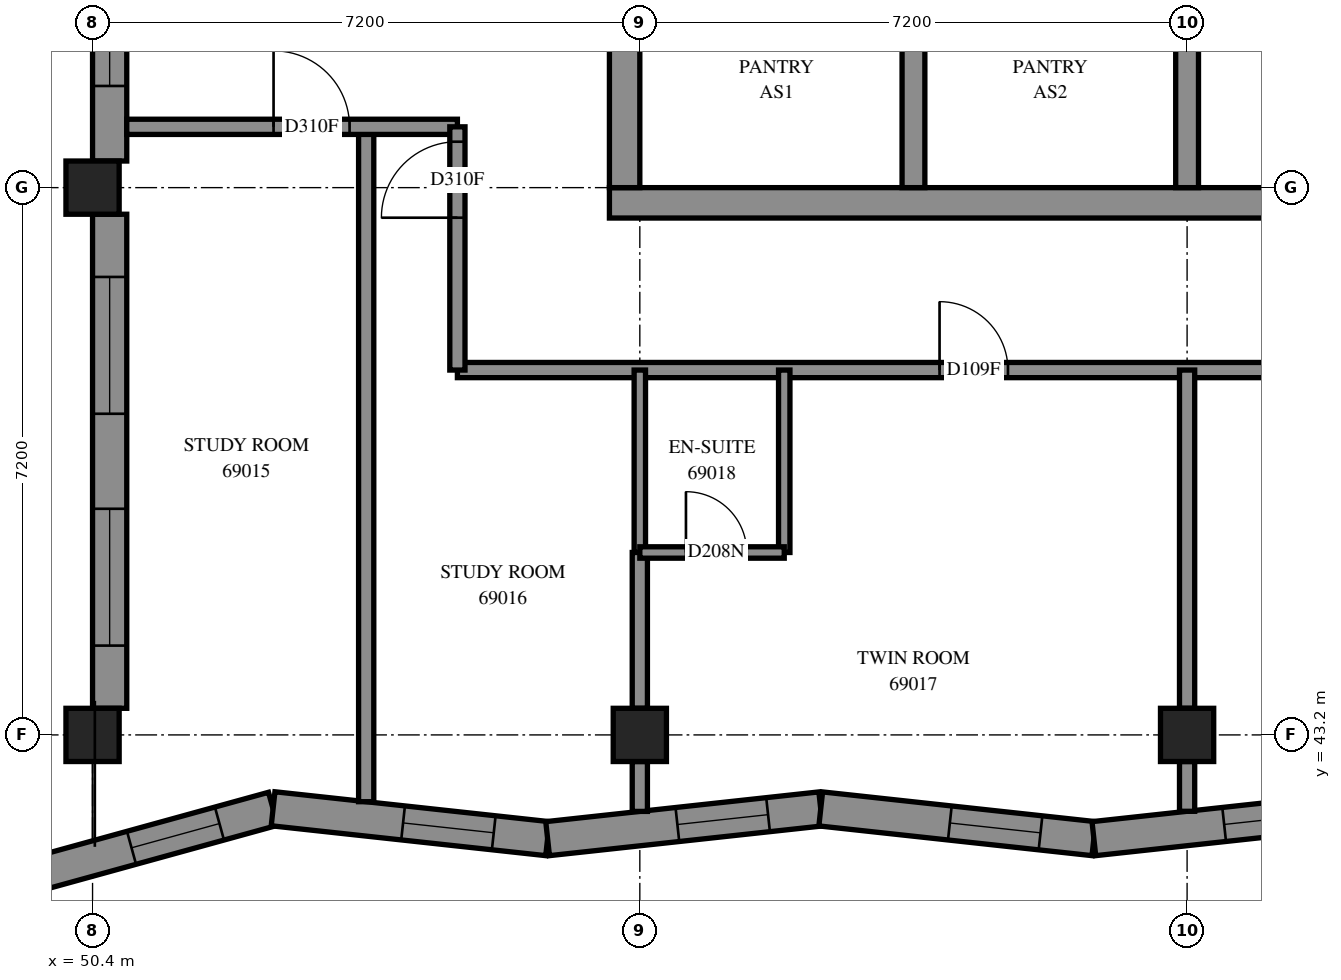
"""IFC4 building model, lengths in metres.
Left out: names, types, materials, properties, quantities, classifications, styles, units other than length and angle.
Written with IfcOpenShell. Run it as: python <this file> out.ifc"""

import sys

from ifc_helpers import new_model, si_unit, direction, frame, frame_2d, origin, origin_2d, place, context, subcontext, project, spatial, polyline, rectangle, outline, extrude, element, fill, save


model = new_model("IFC4")
c1 = context("Model", 3, precision=1e-05, world=origin(), true_north=direction((0.0, 1.0)))
c2 = subcontext(c1, "Body", "Model", "MODEL_VIEW")
j1 = project(units=[si_unit("LENGTHUNIT", "METRE"), si_unit("PLANEANGLEUNIT", "RADIAN")], contexts=[c1])
p1 = place(None, origin())
s1 = spatial("IfcSite", under=j1, at=p1, CompositionType="ELEMENT")
p2 = place(p1, origin())
s2 = spatial("IfcBuilding", under=s1, at=p2, CompositionType="ELEMENT")
p3 = place(p2, frame((0.0, 0.0, 254.0)))
s3 = spatial("IfcBuildingStorey", under=s2, at=p3, CompositionType="ELEMENT", Elevation=254.0)
for number, where, z_axis, x_axis in (
    (1, (50.4, 43.2, 0.0), (0.0, 0.0, 1.0), (1.0, 0.0, 0.0)),
    (2, (50.4, 50.4, 0.0), (0.0, 0.0, 1.0), (1.0, 0.0, 0.0)),
    (3, (57.6, 43.2, 0.0), (0.0, 0.0, 1.0), (1.0, 0.0, 0.0)),
    (4, (64.8, 43.2, 0.0), (0.0, 0.0, 1.0), (1.0, 0.0, 0.0)),
):
    element("IfcColumn", number, at=place(p3, frame(where, z_axis=z_axis, x_axis=x_axis)), inside=s3, PredefinedType="COLUMN", context=c2, shape_type="SweptSolid", body=[
        extrude(rectangle(XDim=0.7, YDim=0.7, at=origin_2d()), origin(), (0.0, 0.0, 1.0), 3.1),
    ])
p4 = place(p3, frame((57.2, 50.2, -0.3), z_axis=(0.0, 0.0, 1.0), x_axis=(1.0, 0.0, 0.0)))
e5 = element("IfcWall", 5, at=p4, inside=s3, PredefinedType="SHEAR", context=c2, shape_type="SweptSolid", body=[
    extrude(rectangle(XDim=15.2, YDim=0.4, at=frame_2d((7.6, 0.0))), origin(), (0.0, 0.0, 1.0), 2.7),
])
p5 = place(p3, frame((57.4, 50.4, -0.3), z_axis=(0.0, 0.0, 1.0), x_axis=(0.0, 1.0, 0.0)))
e6 = element("IfcWall", 6, at=p5, inside=s3, PredefinedType="SHEAR", context=c2, shape_type="SweptSolid", body=[
    extrude(rectangle(XDim=14.4, YDim=0.4, at=frame_2d((7.2, 0.0))), origin(), (0.0, 0.0, 1.0), 2.7),
])
p6 = place(p5, frame((4.55, 0.0, 0.3)))
e7 = element("IfcOpeningElement", 7, at=p6, cuts=e6, PredefinedType="OPENING", context=c2, shape_type="SweptSolid", body=[
    extrude(rectangle(XDim=1.1, YDim=2.1, at=frame_2d((0.55, 1.05))), frame((0.0, 0.21, 0.0), z_axis=(0.0, -1.0, 0.0), x_axis=(1.0, 0.0, 0.0)), (0.0, 0.0, 1.0), 0.42),
])
p7 = place(p5, frame((11.35, 0.0, 0.3)))
e8 = element("IfcOpeningElement", 8, at=p7, cuts=e6, PredefinedType="OPENING", context=c2, shape_type="SweptSolid", body=[
    extrude(rectangle(XDim=1.1, YDim=2.1, at=frame_2d((0.55, 1.05))), frame((0.0, 0.21, 0.0), z_axis=(0.0, -1.0, 0.0), x_axis=(1.0, 0.0, 0.0)), (0.0, 0.0, 1.0), 0.42),
])
for number, where, z_axis, x_axis in (
    (9, (61.2, 50.4, 0.0), (0.0, 0.0, 1.0), (0.0, 1.0, 0.0)),
    (10, (64.8, 50.4, 0.0), (0.0, 0.0, 1.0), (0.0, 1.0, 0.0)),
):
    element("IfcWall", number, at=place(p3, frame(where, z_axis=z_axis, x_axis=x_axis)), inside=s3, PredefinedType="SOLIDWALL", context=c2, shape_type="SweptSolid", body=[
        extrude(rectangle(XDim=3.3, YDim=0.3, at=frame_2d((1.65, 0.0))), origin(), (0.0, 0.0, 1.0), 3.1),
    ])
p8 = place(p3, frame((49.425, 41.304, 0.0), z_axis=(0.0, 0.0, 1.0), x_axis=(0.9640175431, 0.2658386288, 0.0)))
e11 = element("IfcWall", 11, at=p8, inside=s3, PredefinedType="SOLIDWALL", context=c2, shape_type="SweptSolid", body=[
    extrude(outline(polyline([(-0.295, -0.225), (3.432, -0.225), (3.518, 0.225), (0.295, 0.225), (-0.295, -0.225)])), origin(), (0.0, 0.0, 1.0), 3.1),
])
p9 = place(p8, frame((1.543, 0.0, 0.45)))
e12 = element("IfcOpeningElement", 12, at=p9, cuts=e11, PredefinedType="OPENING", context=c2, shape_type="SweptSolid", body=[
    extrude(rectangle(XDim=1.2, YDim=2.55, at=frame_2d((0.6, 1.275))), frame((0.0, 0.235, 0.0), z_axis=(0.0, -1.0, 0.0), x_axis=(1.0, 0.0, 0.0)), (0.0, 0.0, 1.0), 0.47),
])
p10 = place(p3, frame((52.775, 42.228, 0.0), z_axis=(0.0, 0.0, 1.0), x_axis=(0.9941319215, -0.108174501, 0.0)))
e13 = element("IfcWall", 13, at=p10, inside=s3, PredefinedType="SOLIDWALL", context=c2, shape_type="SweptSolid", body=[
    extrude(outline(polyline([(0.043, -0.225), (3.658, -0.225), (3.609, 0.225), (-0.043, 0.225), (0.043, -0.225)])), origin(), (0.0, 0.0, 1.0), 3.1),
])
p11 = place(p10, frame((1.72, 0.0, 0.45)))
e14 = element("IfcOpeningElement", 14, at=p11, cuts=e13, PredefinedType="OPENING", context=c2, shape_type="SweptSolid", body=[
    extrude(rectangle(XDim=1.2, YDim=2.55, at=frame_2d((0.6, 1.275))), frame((0.0, 0.235, 0.0), z_axis=(0.0, -1.0, 0.0), x_axis=(1.0, 0.0, 0.0)), (0.0, 0.0, 1.0), 0.47),
])
p12 = place(p3, frame((56.387, 41.835, 0.0), z_axis=(0.0, 0.0, 1.0), x_axis=(0.994132181, 0.1081721163, 0.0)))
e15 = element("IfcWall", 15, at=p12, inside=s3, PredefinedType="SOLIDWALL", context=c2, shape_type="SweptSolid", body=[
    extrude(outline(polyline([(-0.025, -0.225), (3.59, -0.225), (3.639, 0.225), (0.025, 0.225), (-0.025, -0.225)])), origin(), (0.0, 0.0, 1.0), 3.1),
])
p13 = place(p12, frame((1.718, 0.0, 0.45)))
e16 = element("IfcOpeningElement", 16, at=p13, cuts=e15, PredefinedType="OPENING", context=c2, shape_type="SweptSolid", body=[
    extrude(rectangle(XDim=1.2, YDim=2.55, at=frame_2d((0.6, 1.275))), frame((0.0, 0.235, 0.0), z_axis=(0.0, -1.0, 0.0), x_axis=(1.0, 0.0, 0.0)), (0.0, 0.0, 1.0), 0.47),
])
p14 = place(p3, frame((59.98, 42.226, 0.0), z_axis=(0.0, 0.0, 1.0), x_axis=(0.994132181, -0.1081721163, 0.0)))
e17 = element("IfcWall", 17, at=p14, inside=s3, PredefinedType="SOLIDWALL", context=c2, shape_type="SweptSolid", body=[
    extrude(outline(polyline([(0.025, -0.225), (3.639, -0.225), (3.59, 0.225), (-0.025, 0.225), (0.025, -0.225)])), origin(), (0.0, 0.0, 1.0), 3.1),
])
p15 = place(p14, frame((1.709, 0.0, 0.45)))
e18 = element("IfcOpeningElement", 18, at=p15, cuts=e17, PredefinedType="OPENING", context=c2, shape_type="SweptSolid", body=[
    extrude(rectangle(XDim=1.2, YDim=2.55, at=frame_2d((0.6, 1.275))), frame((0.0, 0.235, 0.0), z_axis=(0.0, -1.0, 0.0), x_axis=(1.0, 0.0, 0.0)), (0.0, 0.0, 1.0), 0.47),
])
p16 = place(p3, frame((63.574, 41.835, 0.0), z_axis=(0.0, 0.0, 1.0), x_axis=(0.9941318572, 0.1081750915, 0.0)))
e19 = element("IfcWall", 19, at=p16, inside=s3, PredefinedType="SOLIDWALL", context=c2, shape_type="SweptSolid", body=[
    extrude(outline(polyline([(-0.025, -0.225), (3.59, -0.225), (3.639, 0.225), (0.025, 0.225), (-0.025, -0.225)])), origin(), (0.0, 0.0, 1.0), 3.1),
])
p17 = place(p16, frame((1.724, 0.0, 0.45)))
e20 = element("IfcOpeningElement", 20, at=p17, cuts=e19, PredefinedType="OPENING", context=c2, shape_type="SweptSolid", body=[
    extrude(rectangle(XDim=1.2, YDim=2.55, at=frame_2d((0.6, 1.275))), frame((0.0, 0.235, 0.0), z_axis=(0.0, -1.0, 0.0), x_axis=(1.0, 0.0, 0.0)), (0.0, 0.0, 1.0), 0.47),
])
p18 = place(p3, frame((50.625, 57.25, 0.0), z_axis=(0.0, 0.0, 1.0), x_axis=(0.0, -1.0, 0.0)))
e21 = element("IfcWall", 21, at=p18, inside=s3, PredefinedType="SOLIDWALL", context=c2, shape_type="SweptSolid", body=[
    extrude(rectangle(XDim=6.5, YDim=0.45, at=frame_2d((3.25, 0.0))), origin(), (0.0, 0.0, 1.0), 3.1),
])
p19 = place(p18, frame((0.825, 0.0, 0.7)))
e22 = element("IfcOpeningElement", 22, at=p19, cuts=e21, PredefinedType="OPENING", context=c2, shape_type="SweptSolid", body=[
    extrude(rectangle(XDim=1.8, YDim=1.8, at=frame_2d((0.9, 0.9))), frame((0.0, 0.235, 0.0), z_axis=(0.0, -1.0, 0.0), x_axis=(1.0, 0.0, 0.0)), (0.0, 0.0, 1.0), 0.47),
])
p20 = place(p18, frame((4.312, 0.0, 0.6)))
e23 = element("IfcOpeningElement", 23, at=p20, cuts=e21, PredefinedType="OPENING", context=c2, shape_type="SweptSolid", body=[
    extrude(rectangle(XDim=1.2, YDim=1.9, at=frame_2d((0.6, 0.95))), frame((0.0, 0.235, 0.0), z_axis=(0.0, -1.0, 0.0), x_axis=(1.0, 0.0, 0.0)), (0.0, 0.0, 1.0), 0.47),
])
p21 = place(p3, frame((50.625, 50.05, 0.0), z_axis=(0.0, 0.0, 1.0), x_axis=(0.0, -1.0, 0.0)))
e24 = element("IfcWall", 24, at=p21, inside=s3, PredefinedType="SOLIDWALL", context=c2, shape_type="SweptSolid", body=[
    extrude(rectangle(XDim=6.5, YDim=0.45, at=frame_2d((3.25, 0.0))), origin(), (0.0, 0.0, 1.0), 3.1),
])
p22 = place(p21, frame((0.825, 0.0, 0.7)))
e25 = element("IfcOpeningElement", 25, at=p22, cuts=e24, PredefinedType="OPENING", context=c2, shape_type="SweptSolid", body=[
    extrude(rectangle(XDim=1.8, YDim=1.8, at=frame_2d((0.9, 0.9))), frame((0.0, 0.235, 0.0), z_axis=(0.0, -1.0, 0.0), x_axis=(1.0, 0.0, 0.0)), (0.0, 0.0, 1.0), 0.47),
])
p23 = place(p21, frame((3.875, 0.0, 0.7)))
e26 = element("IfcOpeningElement", 26, at=p23, cuts=e24, PredefinedType="OPENING", context=c2, shape_type="SweptSolid", body=[
    extrude(rectangle(XDim=1.8, YDim=1.8, at=frame_2d((0.9, 0.9))), frame((0.0, 0.235, 0.0), z_axis=(0.0, -1.0, 0.0), x_axis=(1.0, 0.0, 0.0)), (0.0, 0.0, 1.0), 0.47),
])
p24 = place(p3, frame((55.2, 48.0, 0.0), z_axis=(0.0, 0.0, 1.0), x_axis=(1.0, 0.0, 0.0)))
e27 = element("IfcWall", 27, at=p24, inside=s3, PredefinedType="PARTITIONING", context=c2, shape_type="SweptSolid", body=[
    extrude(rectangle(XDim=19.15, YDim=0.2, at=frame_2d((9.575, 0.0))), origin(), (0.0, 0.0, 1.0), 3.1),
])
p25 = place(p24, frame((6.343, 0.0, 0.0)))
e28 = element("IfcOpeningElement", 28, at=p25, cuts=e27, PredefinedType="OPENING", context=c2, shape_type="SweptSolid", body=[
    extrude(rectangle(XDim=0.9, YDim=2.1, at=frame_2d((0.45, 1.05))), frame((0.0, 0.11, 0.0), z_axis=(0.0, -1.0, 0.0), x_axis=(1.0, 0.0, 0.0)), (0.0, 0.0, 1.0), 0.22),
])
p26 = place(p24, frame((11.633, 0.0, 0.0)))
e29 = element("IfcOpeningElement", 29, at=p26, cuts=e27, PredefinedType="OPENING", context=c2, shape_type="SweptSolid", body=[
    extrude(rectangle(XDim=1.0, YDim=2.1, at=frame_2d((0.5, 1.05))), frame((0.0, 0.11, 0.0), z_axis=(0.0, -1.0, 0.0), x_axis=(1.0, 0.0, 0.0)), (0.0, 0.0, 1.0), 0.22),
])
p27 = place(p24, frame((13.707, 0.0, 0.0)))
e30 = element("IfcOpeningElement", 30, at=p27, cuts=e27, PredefinedType="OPENING", context=c2, shape_type="SweptSolid", body=[
    extrude(rectangle(XDim=1.0, YDim=2.1, at=frame_2d((0.5, 1.05))), frame((0.0, 0.11, 0.0), z_axis=(0.0, -1.0, 0.0), x_axis=(1.0, 0.0, 0.0)), (0.0, 0.0, 1.0), 0.22),
])
p28 = place(p3, frame((54.0, 42.321, 0.0), z_axis=(0.0, 0.0, 1.0), x_axis=(0.0, 1.0, 0.0)))
e31 = element("IfcWall", 31, at=p28, inside=s3, PredefinedType="PARTITIONING", context=c2, shape_type="SweptSolid", body=[
    extrude(rectangle(XDim=8.879, YDim=0.2, at=frame_2d((4.439, 0.0))), origin(), (0.0, 0.0, 1.0), 3.1),
])
p29 = place(p3, frame((64.8, 43.55, 0.0), z_axis=(0.0, 0.0, 1.0), x_axis=(0.0, 1.0, 0.0)))
e32 = element("IfcWall", 32, at=p29, inside=s3, PredefinedType="PARTITIONING", context=c2, shape_type="SweptSolid", body=[
    extrude(rectangle(XDim=4.45, YDim=0.2, at=frame_2d((2.225, 0.0))), origin(), (0.0, 0.0, 1.0), 3.1),
])
p30 = place(p3, frame((50.85, 51.2, 0.0), z_axis=(0.0, 0.0, 1.0), x_axis=(1.0, 0.0, 0.0)))
e33 = element("IfcWall", 33, at=p30, inside=s3, PredefinedType="PARTITIONING", context=c2, shape_type="SweptSolid", body=[
    extrude(rectangle(XDim=4.35, YDim=0.2, at=frame_2d((2.175, 0.0))), origin(), (0.0, 0.0, 1.0), 3.1),
])
p31 = place(p30, frame((1.931, 0.0, 0.0)))
e34 = element("IfcOpeningElement", 34, at=p31, cuts=e33, PredefinedType="OPENING", context=c2, shape_type="SweptSolid", body=[
    extrude(rectangle(XDim=1.0, YDim=2.1, at=frame_2d((0.5, 1.05))), frame((0.0, 0.11, 0.0), z_axis=(0.0, -1.0, 0.0), x_axis=(1.0, 0.0, 0.0)), (0.0, 0.0, 1.0), 0.22),
])
p32 = place(p3, frame((55.2, 48.0, 0.0), z_axis=(0.0, 0.0, 1.0), x_axis=(0.0, 1.0, 0.0)))
e35 = element("IfcWall", 35, at=p32, inside=s3, PredefinedType="PARTITIONING", context=c2, shape_type="SweptSolid", body=[
    extrude(rectangle(XDim=3.2, YDim=0.2, at=frame_2d((1.6, 0.0))), origin(), (0.0, 0.0, 1.0), 3.1),
])
p33 = place(p32, frame((2.004, 0.0, 0.0)))
e36 = element("IfcOpeningElement", 36, at=p33, cuts=e35, PredefinedType="OPENING", context=c2, shape_type="SweptSolid", body=[
    extrude(rectangle(XDim=1.0, YDim=2.1, at=frame_2d((0.5, 1.05))), frame((0.0, 0.11, 0.0), z_axis=(0.0, -1.0, 0.0), x_axis=(1.0, 0.0, 0.0)), (0.0, 0.0, 1.0), 0.22),
])
for number, where, z_axis, x_axis in (
    (37, (59.5, 45.6, 0.0), (0.0, 0.0, 1.0), (0.0, 1.0, 0.0)),
    (38, (57.6, 45.6, 0.0), (0.0, 0.0, 1.0), (0.0, 1.0, 0.0)),
):
    element("IfcWall", number, at=place(p3, frame(where, z_axis=z_axis, x_axis=x_axis)), inside=s3, PredefinedType="PARTITIONING", context=c2, shape_type="SweptSolid", body=[
        extrude(rectangle(XDim=2.4, YDim=0.15, at=frame_2d((1.2, 0.0))), origin(), (0.0, 0.0, 1.0), 3.1),
    ])
p34 = place(p3, frame((57.6, 43.55, 0.0), z_axis=(0.0, 0.0, 1.0), x_axis=(0.0, 1.0, 0.0)))
e39 = element("IfcWall", 39, at=p34, inside=s3, PredefinedType="PARTITIONING", context=c2, shape_type="SweptSolid", body=[
    extrude(rectangle(XDim=2.05, YDim=0.2, at=frame_2d((1.025, 0.0))), origin(), (0.0, 0.0, 1.0), 3.1),
])
p35 = place(p3, frame((57.6, 45.6, 0.0), z_axis=(0.0, 0.0, 1.0), x_axis=(1.0, 0.0, 0.0)))
e40 = element("IfcWall", 40, at=p35, inside=s3, PredefinedType="PARTITIONING", context=c2, shape_type="SweptSolid", body=[
    extrude(rectangle(XDim=1.9, YDim=0.15, at=frame_2d((0.95, 0.0))), origin(), (0.0, 0.0, 1.0), 3.1),
])
p36 = place(p35, frame((0.607, 0.0, 0.0)))
e41 = element("IfcOpeningElement", 41, at=p36, cuts=e40, PredefinedType="OPENING", context=c2, shape_type="SweptSolid", body=[
    extrude(rectangle(XDim=0.8, YDim=2.1, at=frame_2d((0.4, 1.05))), frame((0.0, 0.085, 0.0), z_axis=(0.0, -1.0, 0.0), x_axis=(1.0, 0.0, 0.0)), (0.0, 0.0, 1.0), 0.17),
])
p37 = place(p3, frame((57.6, 42.194, 0.0), z_axis=(0.0, 0.0, 1.0), x_axis=(0.0, 1.0, 0.0)))
e42 = element("IfcWall", 42, at=p37, inside=s3, PredefinedType="PARTITIONING", context=c2, shape_type="SweptSolid", body=[
    extrude(rectangle(XDim=0.656, YDim=0.2, at=frame_2d((0.328, 0.0))), origin(), (0.0, 0.0, 1.0), 3.1),
])
p38 = place(p3, frame((64.8, 42.195, 0.0), z_axis=(0.0, 0.0, 1.0), x_axis=(0.0, 1.0, 0.0)))
e43 = element("IfcWall", 43, at=p38, inside=s3, PredefinedType="PARTITIONING", context=c2, shape_type="SweptSolid", body=[
    extrude(rectangle(XDim=0.655, YDim=0.2, at=frame_2d((0.328, 0.0))), origin(), (0.0, 0.0, 1.0), 3.1),
])
p39 = place(p9, origin())
e44 = element("IfcWindow", 44, at=p39, inside=s3, PartitioningType="SINGLE_PANEL", PredefinedType="WINDOW", context=c2, shape_type="SweptSolid", body=[
    extrude(rectangle(XDim=1.2, YDim=2.55, at=frame_2d((0.6, 1.275))), frame((0.0, 0.205, 0.0), z_axis=(0.0, -1.0, 0.0), x_axis=(1.0, 0.0, 0.0)), (0.0, 0.0, 1.0), 0.06),
])
fill(e12, e44)
p40 = place(p11, origin())
e45 = element("IfcWindow", 45, at=p40, inside=s3, PartitioningType="SINGLE_PANEL", PredefinedType="WINDOW", context=c2, shape_type="SweptSolid", body=[
    extrude(rectangle(XDim=1.2, YDim=2.55, at=frame_2d((0.6, 1.275))), frame((0.0, 0.205, 0.0), z_axis=(0.0, -1.0, 0.0), x_axis=(1.0, 0.0, 0.0)), (0.0, 0.0, 1.0), 0.06),
])
fill(e14, e45)
p41 = place(p13, origin())
e46 = element("IfcWindow", 46, at=p41, inside=s3, PartitioningType="SINGLE_PANEL", PredefinedType="WINDOW", context=c2, shape_type="SweptSolid", body=[
    extrude(rectangle(XDim=1.2, YDim=2.55, at=frame_2d((0.6, 1.275))), frame((0.0, 0.205, 0.0), z_axis=(0.0, -1.0, 0.0), x_axis=(1.0, 0.0, 0.0)), (0.0, 0.0, 1.0), 0.06),
])
fill(e16, e46)
p42 = place(p15, origin())
e47 = element("IfcWindow", 47, at=p42, inside=s3, PartitioningType="SINGLE_PANEL", PredefinedType="WINDOW", context=c2, shape_type="SweptSolid", body=[
    extrude(rectangle(XDim=1.2, YDim=2.55, at=frame_2d((0.6, 1.275))), frame((0.0, 0.205, 0.0), z_axis=(0.0, -1.0, 0.0), x_axis=(1.0, 0.0, 0.0)), (0.0, 0.0, 1.0), 0.06),
])
fill(e18, e47)
p43 = place(p17, origin())
e48 = element("IfcWindow", 48, at=p43, inside=s3, PartitioningType="SINGLE_PANEL", PredefinedType="WINDOW", context=c2, shape_type="SweptSolid", body=[
    extrude(rectangle(XDim=1.2, YDim=2.55, at=frame_2d((0.6, 1.275))), frame((0.0, 0.205, 0.0), z_axis=(0.0, -1.0, 0.0), x_axis=(1.0, 0.0, 0.0)), (0.0, 0.0, 1.0), 0.06),
])
fill(e20, e48)
p44 = place(p22, origin())
e49 = element("IfcWindow", 49, at=p44, inside=s3, PartitioningType="SINGLE_PANEL", PredefinedType="WINDOW", context=c2, shape_type="SweptSolid", body=[
    extrude(rectangle(XDim=1.8, YDim=1.8, at=frame_2d((0.9, 0.9))), frame((0.0, 0.205, 0.0), z_axis=(0.0, -1.0, 0.0), x_axis=(1.0, 0.0, 0.0)), (0.0, 0.0, 1.0), 0.06),
])
fill(e25, e49)
p45 = place(p23, origin())
e50 = element("IfcWindow", 50, at=p45, inside=s3, PartitioningType="SINGLE_PANEL", PredefinedType="WINDOW", context=c2, shape_type="SweptSolid", body=[
    extrude(rectangle(XDim=1.8, YDim=1.8, at=frame_2d((0.9, 0.9))), frame((0.0, 0.205, 0.0), z_axis=(0.0, -1.0, 0.0), x_axis=(1.0, 0.0, 0.0)), (0.0, 0.0, 1.0), 0.06),
])
fill(e26, e50)
p46 = place(p31, origin())
e51 = element("IfcDoor", 51, at=p46, inside=s3, OperationType="SINGLE_SWING_LEFT", PredefinedType="DOOR", context=c2, shape_type="SweptSolid", body=[
    extrude(rectangle(XDim=1.0, YDim=2.1, at=frame_2d((0.5, 1.05))), frame((0.0, 0.025, 0.0), z_axis=(0.0, -1.0, 0.0), x_axis=(1.0, 0.0, 0.0)), (0.0, 0.0, 1.0), 0.05),
])
fill(e34, e51)
p47 = place(p33, origin())
e52 = element("IfcDoor", 52, at=p47, inside=s3, OperationType="SINGLE_SWING_RIGHT", PredefinedType="DOOR", context=c2, shape_type="SweptSolid", body=[
    extrude(rectangle(XDim=1.0, YDim=2.1, at=frame_2d((0.5, 1.05))), frame((0.0, 0.025, 0.0), z_axis=(0.0, -1.0, 0.0), x_axis=(1.0, 0.0, 0.0)), (0.0, 0.0, 1.0), 0.05),
])
fill(e36, e52)
p48 = place(p25, origin())
e53 = element("IfcDoor", 53, at=p48, inside=s3, OperationType="SINGLE_SWING_LEFT", PredefinedType="DOOR", context=c2, shape_type="SweptSolid", body=[
    extrude(rectangle(XDim=0.9, YDim=2.1, at=frame_2d((0.45, 1.05))), frame((0.0, 0.025, 0.0), z_axis=(0.0, -1.0, 0.0), x_axis=(1.0, 0.0, 0.0)), (0.0, 0.0, 1.0), 0.05),
])
fill(e28, e53)
p49 = place(p36, origin())
e54 = element("IfcDoor", 54, at=p49, inside=s3, OperationType="SINGLE_SWING_RIGHT", PredefinedType="DOOR", context=c2, shape_type="SweptSolid", body=[
    extrude(rectangle(XDim=0.8, YDim=2.1, at=frame_2d((0.4, 1.05))), frame((0.0, 0.025, 0.0), z_axis=(0.0, -1.0, 0.0), x_axis=(1.0, 0.0, 0.0)), (0.0, 0.0, 1.0), 0.05),
])
fill(e41, e54)
p50 = place(p20, origin())
e55 = element("IfcWindow", 55, at=p50, inside=s3, PartitioningType="SINGLE_PANEL", PredefinedType="WINDOW", context=c2, shape_type="SweptSolid", body=[
    extrude(rectangle(XDim=1.2, YDim=1.9, at=frame_2d((0.6, 0.95))), frame((0.0, 0.205, 0.0), z_axis=(0.0, -1.0, 0.0), x_axis=(1.0, 0.0, 0.0)), (0.0, 0.0, 1.0), 0.06),
])
fill(e23, e55)
save(model, sys.argv[1])
